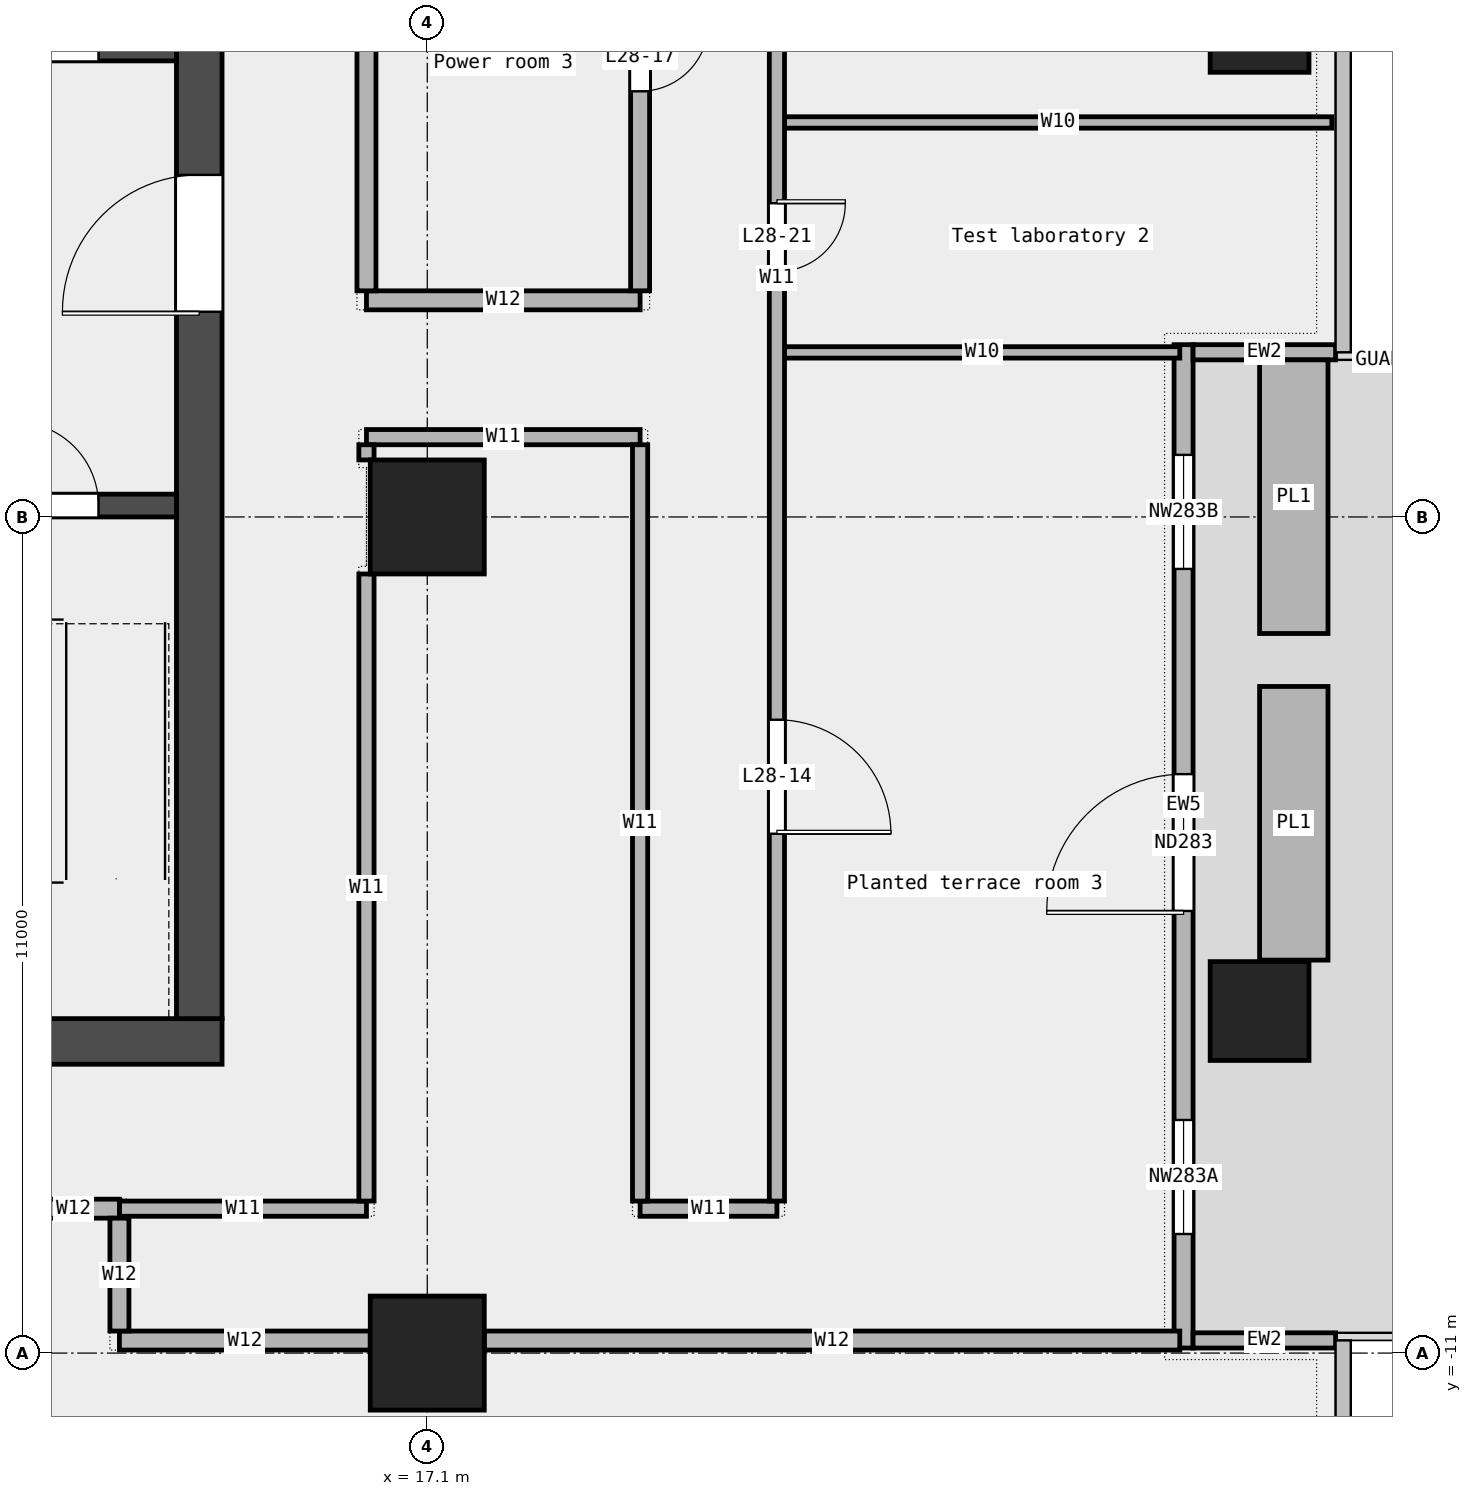
"""IFC4 building model, lengths in metres.
Left out: names, types, materials, properties, quantities, classifications, styles, units other than length and angle.
Written with IfcOpenShell. Run it as: python <this file> out.ifc"""

import sys

from ifc_helpers import new_model, si_unit, direction, frame, frame_2d, origin, origin_2d, place, context, subcontext, project, spatial, rectangle, extrude, element, fill, save


model = new_model("IFC4")
c1 = context("Model", 3, precision=1e-05, world=origin(), true_north=direction((0.0, 1.0)))
c2 = subcontext(c1, "Body", "Model", "MODEL_VIEW")
j1 = project(units=[si_unit("LENGTHUNIT", "METRE"), si_unit("PLANEANGLEUNIT", "RADIAN")], contexts=[c1])
p1 = place(None, origin())
s1 = spatial("IfcSite", under=j1, at=p1, CompositionType="ELEMENT")
p2 = place(p1, origin())
s2 = spatial("IfcBuilding", under=s1, at=p2, CompositionType="ELEMENT")
p3 = place(p2, frame((0.0, 0.0, 139.6)))
s3 = spatial("IfcBuildingStorey", under=s2, at=p3, CompositionType="ELEMENT", Elevation=139.6)
for number, where, z_axis, x_axis in (
    (1, (28.05, -6.5, 0.0), (0.0, 0.0, 1.0), (1.0, 0.0, 0.0)),
    (2, (28.05, 6.5, 0.0), (0.0, 0.0, 1.0), (1.0, 0.0, 0.0)),
):
    element("IfcColumn", number, at=place(p3, frame(where, z_axis=z_axis, x_axis=x_axis)), inside=s3, PredefinedType="COLUMN", context=c2, shape_type="SweptSolid", body=[
        extrude(rectangle(XDim=1.3, YDim=1.3, at=origin_2d()), origin(), (0.0, 0.0, 1.0), 4.05),
    ])
for number, where, z_axis, x_axis in (
    (3, (17.1, -11.0, 0.0), (0.0, 0.0, 1.0), (1.0, 0.0, 0.0)),
    (4, (17.1, 0.0, 0.0), (0.0, 0.0, 1.0), (1.0, 0.0, 0.0)),
):
    element("IfcColumn", number, at=place(p3, frame(where, z_axis=z_axis, x_axis=x_axis)), inside=s3, PredefinedType="COLUMN", context=c2, shape_type="SweptSolid", body=[
        extrude(rectangle(XDim=1.5, YDim=1.5, at=origin_2d()), origin(), (0.0, 0.0, 1.0), 4.05),
    ])
p4 = place(p3, frame((27.05, -10.933, 0.0), z_axis=(0.0, 0.0, 1.0), x_axis=(0.0, 1.0, 0.0)))
e5 = element("IfcWall", 5, at=p4, inside=s3, PredefinedType="STANDARD", context=c2, shape_type="SweptSolid", body=[
    extrude(rectangle(XDim=13.2, YDim=0.25, at=frame_2d((6.6, 0.0))), origin(), (0.0, 0.0, 1.0), 4.05),
])
p5 = place(p4, frame((1.5, 0.0, 0.45)))
e6 = element("IfcOpeningElement", 6, at=p5, cuts=e5, PredefinedType="OPENING", context=c2, shape_type="SweptSolid", body=[
    extrude(rectangle(XDim=1.5, YDim=3.0, at=frame_2d((0.75, 1.5))), frame((0.0, 0.137, 0.0), z_axis=(0.0, -1.0, 0.0), x_axis=(1.0, 0.0, 0.0)), (0.0, 0.0, 1.0), 0.274),
])
p6 = place(p4, frame((5.75, 0.0, 0.0)))
e7 = element("IfcOpeningElement", 7, at=p6, cuts=e5, PredefinedType="OPENING", context=c2, shape_type="SweptSolid", body=[
    extrude(rectangle(XDim=1.8, YDim=2.4, at=frame_2d((0.9, 1.2))), frame((0.0, 0.137, 0.0), z_axis=(0.0, -1.0, 0.0), x_axis=(1.0, 0.0, 0.0)), (0.0, 0.0, 1.0), 0.274),
])
p7 = place(p4, frame((10.25, 0.0, 0.45)))
e8 = element("IfcOpeningElement", 8, at=p7, cuts=e5, PredefinedType="OPENING", context=c2, shape_type="SweptSolid", body=[
    extrude(rectangle(XDim=1.5, YDim=3.0, at=frame_2d((0.75, 1.5))), frame((0.0, 0.137, 0.0), z_axis=(0.0, -1.0, 0.0), x_axis=(1.0, 0.0, 0.0)), (0.0, 0.0, 1.0), 0.274),
])
for number, where, z_axis, x_axis in (
    (9, (29.05, -10.833, 0.0), (0.0, 0.0, 1.0), (-1.0, 0.0, 0.0)),
    (10, (29.05, 2.167, 0.0), (0.0, 0.0, 1.0), (-1.0, 0.0, 0.0)),
):
    element("IfcWall", number, at=place(p3, frame(where, z_axis=z_axis, x_axis=x_axis)), inside=s3, PredefinedType="STANDARD", context=c2, shape_type="SweptSolid", body=[
        extrude(rectangle(XDim=1.875, YDim=0.2, at=frame_2d((0.938, 0.0))), origin(), (0.0, 0.0, 1.0), 4.05),
    ])
for number, where, z_axis, x_axis in (
    (11, (28.5, -5.83, 0.0), (0.0, 0.0, 1.0), (0.0, 1.0, 0.0)),
    (12, (28.5, -1.533, 0.0), (0.0, 0.0, 1.0), (0.0, 1.0, 0.0)),
):
    element("IfcWall", number, at=place(p3, frame(where, z_axis=z_axis, x_axis=x_axis)), inside=s3, PredefinedType="STANDARD", context=c2, shape_type="SweptSolid", body=[
        extrude(rectangle(XDim=3.6, YDim=0.9, at=frame_2d((1.8, 0.0))), origin(), (0.0, 0.0, 1.0), 0.7),
    ])
p8 = place(p3, frame((13.05, -10.835, 0.0), z_axis=(0.0, 0.0, 1.0), x_axis=(1.0, 0.0, 0.0)))
e13 = element("IfcWall", 13, at=p8, inside=s3, PredefinedType="PARTITIONING", context=c2, shape_type="SweptSolid", body=[
    extrude(rectangle(XDim=3.3, YDim=0.25, at=frame_2d((1.65, 0.0))), origin(), (0.0, 0.0, 1.0), 4.05),
])
p9 = place(p3, frame((17.85, -10.835, 0.0), z_axis=(0.0, 0.0, 1.0), x_axis=(1.0, 0.0, 0.0)))
e14 = element("IfcWall", 14, at=p9, inside=s3, PredefinedType="PARTITIONING", context=c2, shape_type="SweptSolid", body=[
    extrude(rectangle(XDim=9.15, YDim=0.25, at=frame_2d((4.575, 0.0))), origin(), (0.0, 0.0, 1.0), 4.05),
])
p10 = place(p3, frame((13.05, -9.1, 0.0), z_axis=(0.0, 0.0, 1.0), x_axis=(1.0, 0.0, 0.0)))
e15 = element("IfcWall", 15, at=p10, inside=s3, PredefinedType="PARTITIONING", context=c2, shape_type="SweptSolid", body=[
    extrude(rectangle(XDim=3.25, YDim=0.2, at=frame_2d((1.625, 0.0))), origin(), (0.0, 0.0, 1.0), 4.05),
])
p11 = place(p3, frame((19.9, -9.1, 0.0), z_axis=(0.0, 0.0, 1.0), x_axis=(1.0, 0.0, 0.0)))
e16 = element("IfcWall", 16, at=p11, inside=s3, PredefinedType="PARTITIONING", context=c2, shape_type="SweptSolid", body=[
    extrude(rectangle(XDim=1.8, YDim=0.2, at=frame_2d((0.9, 0.0))), origin(), (0.0, 0.0, 1.0), 4.05),
])
p12 = place(p3, frame((11.845, -9.1, 0.0), z_axis=(0.0, 0.0, 1.0), x_axis=(1.0, 0.0, 0.0)))
e17 = element("IfcWall", 17, at=p12, inside=s3, PredefinedType="PARTITIONING", context=c2, shape_type="SweptSolid", body=[
    extrude(rectangle(XDim=1.205, YDim=0.25, at=frame_2d((0.603, 0.0))), origin(), (0.0, 0.0, 1.0), 4.05),
])
p13 = place(p3, frame((16.3, 1.05, 0.0), z_axis=(0.0, 0.0, 1.0), x_axis=(1.0, 0.0, 0.0)))
e18 = element("IfcWall", 18, at=p13, inside=s3, PredefinedType="PARTITIONING", context=c2, shape_type="SweptSolid", body=[
    extrude(rectangle(XDim=3.6, YDim=0.2, at=frame_2d((1.8, 0.0))), origin(), (0.0, 0.0, 1.0), 4.05),
])
p14 = place(p3, frame((21.8, 2.165, 0.0), z_axis=(0.0, 0.0, 1.0), x_axis=(1.0, 0.0, 0.0)))
e19 = element("IfcWall", 19, at=p14, inside=s3, PredefinedType="PARTITIONING", context=c2, shape_type="SweptSolid", body=[
    extrude(rectangle(XDim=5.2, YDim=0.15, at=frame_2d((2.6, 0.0))), origin(), (0.0, 0.0, 1.0), 4.05),
])
p15 = place(p3, frame((16.3, 2.85, 0.0), z_axis=(0.0, 0.0, 1.0), x_axis=(1.0, 0.0, 0.0)))
e20 = element("IfcWall", 20, at=p15, inside=s3, PredefinedType="PARTITIONING", context=c2, shape_type="SweptSolid", body=[
    extrude(rectangle(XDim=3.6, YDim=0.25, at=frame_2d((1.8, 0.0))), origin(), (0.0, 0.0, 1.0), 4.05),
])
p16 = place(p3, frame((21.8, 5.19, 0.0), z_axis=(0.0, 0.0, 1.0), x_axis=(1.0, 0.0, 0.0)))
e21 = element("IfcWall", 21, at=p16, inside=s3, PredefinedType="PARTITIONING", context=c2, shape_type="SweptSolid", body=[
    extrude(rectangle(XDim=7.2, YDim=0.15, at=frame_2d((3.6, 0.0))), origin(), (0.0, 0.0, 1.0), 4.05),
])
p17 = place(p3, frame((13.05, -10.71, 0.0), z_axis=(0.0, 0.0, 1.0), x_axis=(0.0, 1.0, 0.0)))
e22 = element("IfcWall", 22, at=p17, inside=s3, PredefinedType="PARTITIONING", context=c2, shape_type="SweptSolid", body=[
    extrude(rectangle(XDim=1.485, YDim=0.25, at=frame_2d((0.742, 0.0))), origin(), (0.0, 0.0, 1.0), 4.05),
])
p18 = place(p3, frame((16.3, -9.0, 0.0), z_axis=(0.0, 0.0, 1.0), x_axis=(0.0, 1.0, 0.0)))
e23 = element("IfcWall", 23, at=p18, inside=s3, PredefinedType="PARTITIONING", context=c2, shape_type="SweptSolid", body=[
    extrude(rectangle(XDim=8.25, YDim=0.2, at=frame_2d((4.125, 0.0))), origin(), (0.0, 0.0, 1.0), 4.05),
])
p19 = place(p3, frame((16.3, 0.75, 0.0), z_axis=(0.0, 0.0, 1.0), x_axis=(0.0, 1.0, 0.0)))
e24 = element("IfcWall", 24, at=p19, inside=s3, PredefinedType="PARTITIONING", context=c2, shape_type="SweptSolid", body=[
    extrude(rectangle(XDim=0.2, YDim=0.2, at=frame_2d((0.1, 0.0))), origin(), (0.0, 0.0, 1.0), 4.05),
])
p20 = place(p3, frame((16.3, 2.975, 0.0), z_axis=(0.0, 0.0, 1.0), x_axis=(0.0, 1.0, 0.0)))
e25 = element("IfcWall", 25, at=p20, inside=s3, PredefinedType="PARTITIONING", context=c2, shape_type="SweptSolid", body=[
    extrude(rectangle(XDim=7.275, YDim=0.25, at=frame_2d((3.637, 0.0))), origin(), (0.0, 0.0, 1.0), 4.05),
])
p21 = place(p3, frame((19.9, -9.0, 0.0), z_axis=(0.0, 0.0, 1.0), x_axis=(0.0, 1.0, 0.0)))
e26 = element("IfcWall", 26, at=p21, inside=s3, PredefinedType="PARTITIONING", context=c2, shape_type="SweptSolid", body=[
    extrude(rectangle(XDim=9.95, YDim=0.2, at=frame_2d((4.975, 0.0))), origin(), (0.0, 0.0, 1.0), 4.05),
])
p22 = place(p3, frame((19.9, 2.975, 0.0), z_axis=(0.0, 0.0, 1.0), x_axis=(0.0, 1.0, 0.0)))
e27 = element("IfcWall", 27, at=p22, inside=s3, PredefinedType="PARTITIONING", context=c2, shape_type="SweptSolid", body=[
    extrude(rectangle(XDim=12.3, YDim=0.25, at=frame_2d((6.15, 0.0))), origin(), (0.0, 0.0, 1.0), 4.05),
])
p23 = place(p22, frame((8.775, 0.0, 0.0)))
e28 = element("IfcOpeningElement", 28, at=p23, cuts=e27, PredefinedType="OPENING", context=c2, shape_type="SweptSolid", body=[
    extrude(rectangle(XDim=0.9, YDim=2.1, at=frame_2d((0.45, 1.05))), frame((0.0, 0.137, 0.0), z_axis=(0.0, -1.0, 0.0), x_axis=(1.0, 0.0, 0.0)), (0.0, 0.0, 1.0), 0.274),
])
p24 = place(p22, frame((2.625, 0.0, 0.0)))
e29 = element("IfcOpeningElement", 29, at=p24, cuts=e27, PredefinedType="OPENING", context=c2, shape_type="SweptSolid", body=[
    extrude(rectangle(XDim=0.9, YDim=2.1, at=frame_2d((0.45, 1.05))), frame((0.0, 0.137, 0.0), z_axis=(0.0, -1.0, 0.0), x_axis=(1.0, 0.0, 0.0)), (0.0, 0.0, 1.0), 0.274),
])
p25 = place(p3, frame((21.7, -9.0, 0.0), z_axis=(0.0, 0.0, 1.0), x_axis=(0.0, 1.0, 0.0)))
e30 = element("IfcWall", 30, at=p25, inside=s3, PredefinedType="PARTITIONING", context=c2, shape_type="SweptSolid", body=[
    extrude(rectangle(XDim=24.3, YDim=0.2, at=frame_2d((12.15, 0.0))), origin(), (0.0, 0.0, 1.0), 4.05),
])
p26 = place(p25, frame((18.645, 0.0, 0.0)))
e31 = element("IfcOpeningElement", 31, at=p26, cuts=e30, PredefinedType="OPENING", context=c2, shape_type="SweptSolid", body=[
    extrude(rectangle(XDim=1.2, YDim=2.1, at=frame_2d((0.6, 1.05))), frame((0.0, 0.112, 0.0), z_axis=(0.0, -1.0, 0.0), x_axis=(1.0, 0.0, 0.0)), (0.0, 0.0, 1.0), 0.224),
])
p27 = place(p25, frame((4.833, 0.0, 0.0)))
e32 = element("IfcOpeningElement", 32, at=p27, cuts=e30, PredefinedType="OPENING", context=c2, shape_type="SweptSolid", body=[
    extrude(rectangle(XDim=1.5, YDim=2.1, at=frame_2d((0.75, 1.05))), frame((0.0, 0.112, 0.0), z_axis=(0.0, -1.0, 0.0), x_axis=(1.0, 0.0, 0.0)), (0.0, 0.0, 1.0), 0.224),
])
p28 = place(p25, frame((12.228, 0.0, 0.0)))
e33 = element("IfcOpeningElement", 33, at=p28, cuts=e30, PredefinedType="OPENING", context=c2, shape_type="SweptSolid", body=[
    extrude(rectangle(XDim=0.9, YDim=2.1, at=frame_2d((0.45, 1.05))), frame((0.0, 0.112, 0.0), z_axis=(0.0, -1.0, 0.0), x_axis=(1.0, 0.0, 0.0)), (0.0, 0.0, 1.0), 0.224),
])
p29 = place(p3, frame((-14.4, -6.9, 0.0), z_axis=(0.0, 0.0, 1.0), x_axis=(1.0, 0.0, 0.0)))
e34 = element("IfcWall", 34, at=p29, inside=s3, PredefinedType="SHEAR", context=c2, shape_type="SweptSolid", body=[
    extrude(rectangle(XDim=28.8, YDim=0.6, at=frame_2d((14.4, 0.0))), origin(), (0.0, 0.0, 1.0), 4.2),
])
p30 = place(p29, frame((4.9, 0.0, 0.0)))
e35 = element("IfcOpeningElement", 35, at=p30, cuts=e34, PredefinedType="OPENING", context=c2, shape_type="SweptSolid", body=[
    extrude(rectangle(XDim=1.0, YDim=2.1, at=frame_2d((0.5, 1.05))), frame((0.0, 0.312, 0.0), z_axis=(0.0, -1.0, 0.0), x_axis=(1.0, 0.0, 0.0)), (0.0, 0.0, 1.0), 0.624),
])
p31 = place(p29, frame((9.3, 0.0, 0.0)))
e36 = element("IfcOpeningElement", 36, at=p31, cuts=e34, PredefinedType="OPENING", context=c2, shape_type="SweptSolid", body=[
    extrude(rectangle(XDim=1.2, YDim=2.1, at=frame_2d((0.6, 1.05))), frame((0.0, 0.312, 0.0), z_axis=(0.0, -1.0, 0.0), x_axis=(1.0, 0.0, 0.0)), (0.0, 0.0, 1.0), 0.624),
])
p32 = place(p29, frame((14.462, 0.0, 0.0)))
e37 = element("IfcOpeningElement", 37, at=p32, cuts=e34, PredefinedType="OPENING", context=c2, shape_type="SweptSolid", body=[
    extrude(rectangle(XDim=1.0, YDim=2.1, at=frame_2d((0.5, 1.05))), frame((0.0, 0.312, 0.0), z_axis=(0.0, -1.0, 0.0), x_axis=(1.0, 0.0, 0.0)), (0.0, 0.0, 1.0), 0.624),
])
p33 = place(p29, frame((18.75, 0.0, 0.0)))
e38 = element("IfcOpeningElement", 38, at=p33, cuts=e34, PredefinedType="OPENING", context=c2, shape_type="SweptSolid", body=[
    extrude(rectangle(XDim=1.8, YDim=2.1, at=frame_2d((0.9, 1.05))), frame((0.0, 0.312, 0.0), z_axis=(0.0, -1.0, 0.0), x_axis=(1.0, 0.0, 0.0)), (0.0, 0.0, 1.0), 0.624),
])
p34 = place(p29, frame((23.087, 0.0, 0.0)))
e39 = element("IfcOpeningElement", 39, at=p34, cuts=e34, PredefinedType="OPENING", context=c2, shape_type="SweptSolid", body=[
    extrude(rectangle(XDim=1.0, YDim=2.1, at=frame_2d((0.5, 1.05))), frame((0.0, 0.312, 0.0), z_axis=(0.0, -1.0, 0.0), x_axis=(1.0, 0.0, 0.0)), (0.0, 0.0, 1.0), 0.624),
])
p35 = place(p3, frame((14.1, -6.6, 0.0), z_axis=(0.0, 0.0, 1.0), x_axis=(0.0, 1.0, 0.0)))
e40 = element("IfcWall", 40, at=p35, inside=s3, PredefinedType="SHEAR", context=c2, shape_type="SweptSolid", body=[
    extrude(rectangle(XDim=19.5, YDim=0.6, at=frame_2d((9.75, 0.0))), origin(), (0.0, 0.0, 1.0), 4.2),
])
p36 = place(p35, frame((9.3, 0.0, 0.0)))
e41 = element("IfcOpeningElement", 41, at=p36, cuts=e40, PredefinedType="OPENING", context=c2, shape_type="SweptSolid", body=[
    extrude(rectangle(XDim=1.8, YDim=2.1, at=frame_2d((0.9, 1.05))), frame((0.0, 0.312, 0.0), z_axis=(0.0, -1.0, 0.0), x_axis=(1.0, 0.0, 0.0)), (0.0, 0.0, 1.0), 0.624),
])
p37 = place(p3, frame((10.65, 0.15, 0.0), z_axis=(0.0, 0.0, 1.0), x_axis=(1.0, 0.0, 0.0)))
e42 = element("IfcWall", 42, at=p37, inside=s3, PredefinedType="SOLIDWALL", context=c2, shape_type="SweptSolid", body=[
    extrude(rectangle(XDim=3.15, YDim=0.3, at=frame_2d((1.575, 0.0))), origin(), (0.0, 0.0, 1.0), 4.2),
])
p38 = place(p37, frame((1.025, 0.0, 0.0)))
e43 = element("IfcOpeningElement", 43, at=p38, cuts=e42, PredefinedType="OPENING", context=c2, shape_type="SweptSolid", body=[
    extrude(rectangle(XDim=1.1, YDim=2.1, at=frame_2d((0.55, 1.05))), frame((0.0, 0.162, 0.0), z_axis=(0.0, -1.0, 0.0), x_axis=(1.0, 0.0, 0.0)), (0.0, 0.0, 1.0), 0.324),
])
p39 = place(p3, frame((10.65, 6.15, 0.0), z_axis=(0.0, 0.0, 1.0), x_axis=(1.0, 0.0, 0.0)))
e44 = element("IfcWall", 44, at=p39, inside=s3, PredefinedType="SOLIDWALL", context=c2, shape_type="SweptSolid", body=[
    extrude(rectangle(XDim=3.15, YDim=0.3, at=frame_2d((1.575, 0.0))), origin(), (0.0, 0.0, 1.0), 4.2),
])
p40 = place(p39, frame((1.025, 0.0, 0.0)))
e45 = element("IfcOpeningElement", 45, at=p40, cuts=e44, PredefinedType="OPENING", context=c2, shape_type="SweptSolid", body=[
    extrude(rectangle(XDim=1.1, YDim=2.1, at=frame_2d((0.55, 1.05))), frame((0.0, 0.162, 0.0), z_axis=(0.0, -1.0, 0.0), x_axis=(1.0, 0.0, 0.0)), (0.0, 0.0, 1.0), 0.324),
])
p41 = place(p5, origin())
e46 = element("IfcWindow", 46, at=p41, inside=s3, PartitioningType="SINGLE_PANEL", PredefinedType="WINDOW", context=c2, shape_type="SweptSolid", body=[
    extrude(rectangle(XDim=1.5, YDim=3.0, at=frame_2d((0.75, 1.5))), frame((0.0, 0.03, 0.0), z_axis=(0.0, -1.0, 0.0), x_axis=(1.0, 0.0, 0.0)), (0.0, 0.0, 1.0), 0.06),
])
fill(e6, e46)
p42 = place(p6, origin())
e47 = element("IfcDoor", 47, at=p42, inside=s3, OperationType="DOUBLE_DOOR_SINGLE_SWING", PredefinedType="DOOR", context=c2, shape_type="SweptSolid", body=[
    extrude(rectangle(XDim=1.8, YDim=2.4, at=frame_2d((0.9, 1.2))), frame((0.0, 0.025, 0.0), z_axis=(0.0, -1.0, 0.0), x_axis=(1.0, 0.0, 0.0)), (0.0, 0.0, 1.0), 0.05),
])
fill(e7, e47)
p43 = place(p7, origin())
e48 = element("IfcWindow", 48, at=p43, inside=s3, PartitioningType="SINGLE_PANEL", PredefinedType="WINDOW", context=c2, shape_type="SweptSolid", body=[
    extrude(rectangle(XDim=1.5, YDim=3.0, at=frame_2d((0.75, 1.5))), frame((0.0, 0.03, 0.0), z_axis=(0.0, -1.0, 0.0), x_axis=(1.0, 0.0, 0.0)), (0.0, 0.0, 1.0), 0.06),
])
fill(e8, e48)
p44 = place(p27, origin())
e49 = element("IfcDoor", 49, at=p44, inside=s3, OperationType="DOUBLE_DOOR_SINGLE_SWING", PredefinedType="DOOR", context=c2, shape_type="SweptSolid", body=[
    extrude(rectangle(XDim=1.5, YDim=2.1, at=frame_2d((0.75, 1.05))), frame((0.0, 0.025, 0.0), z_axis=(0.0, -1.0, 0.0), x_axis=(1.0, 0.0, 0.0)), (0.0, 0.0, 1.0), 0.05),
])
fill(e32, e49)
p45 = place(p24, origin())
e50 = element("IfcDoor", 50, at=p45, inside=s3, OperationType="SINGLE_SWING_LEFT", PredefinedType="DOOR", context=c2, shape_type="SweptSolid", body=[
    extrude(rectangle(XDim=0.9, YDim=2.1, at=frame_2d((0.45, 1.05))), frame((0.0, 0.025, 0.0), z_axis=(0.0, -1.0, 0.0), x_axis=(1.0, 0.0, 0.0)), (0.0, 0.0, 1.0), 0.05),
])
fill(e29, e50)
p46 = place(p28, origin())
e51 = element("IfcDoor", 51, at=p46, inside=s3, OperationType="SINGLE_SWING_LEFT", PredefinedType="DOOR", context=c2, shape_type="SweptSolid", body=[
    extrude(rectangle(XDim=0.9, YDim=2.1, at=frame_2d((0.45, 1.05))), frame((0.0, 0.025, 0.0), z_axis=(0.0, -1.0, 0.0), x_axis=(1.0, 0.0, 0.0)), (0.0, 0.0, 1.0), 0.05),
])
fill(e33, e51)
p47 = place(p38, origin())
e52 = element("IfcDoor", 52, at=p47, inside=s3, OperationType="SINGLE_SWING_RIGHT", PredefinedType="DOOR", context=c2, shape_type="SweptSolid", body=[
    extrude(rectangle(XDim=1.1, YDim=2.1, at=frame_2d((0.55, 1.05))), frame((0.0, 0.025, 0.0), z_axis=(0.0, -1.0, 0.0), x_axis=(1.0, 0.0, 0.0)), (0.0, 0.0, 1.0), 0.05),
])
fill(e43, e52)
p48 = place(p36, origin())
e53 = element("IfcDoor", 53, at=p48, inside=s3, OperationType="DOUBLE_DOOR_SINGLE_SWING", PredefinedType="DOOR", context=c2, shape_type="SweptSolid", body=[
    extrude(rectangle(XDim=1.8, YDim=2.1, at=frame_2d((0.9, 1.05))), frame((0.0, 0.025, 0.0), z_axis=(0.0, -1.0, 0.0), x_axis=(1.0, 0.0, 0.0)), (0.0, 0.0, 1.0), 0.05),
])
fill(e41, e53)
save(model, sys.argv[1])
